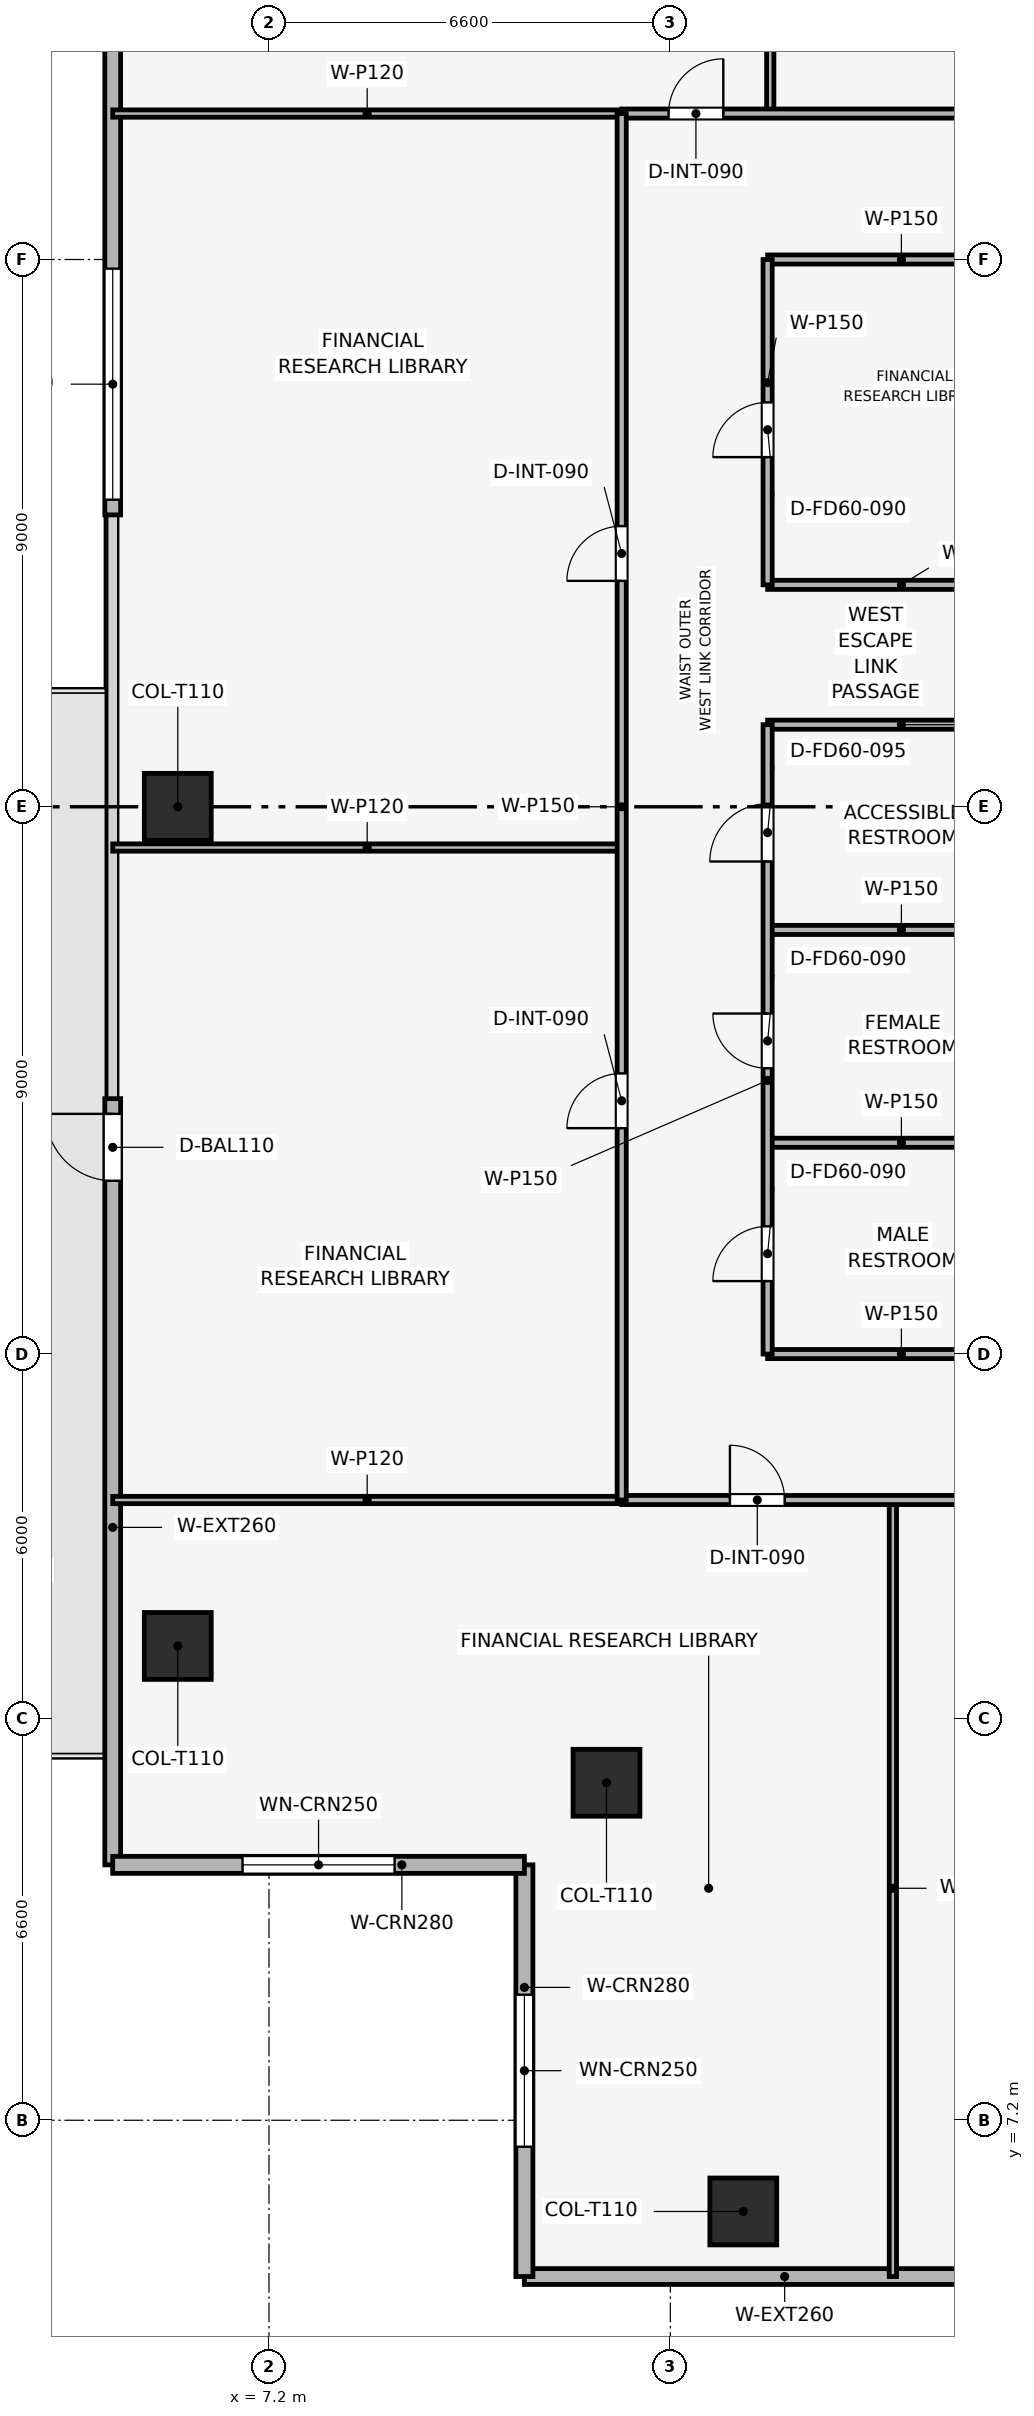
"""IFC4 building model, lengths in metres.
Left out: names, types, materials, properties, quantities, classifications, styles, units other than length and angle.
Written with IfcOpenShell. Run it as: python <this file> out.ifc"""

import sys

from ifc_helpers import new_model, si_unit, direction, frame, frame_2d, origin, origin_2d, place, context, subcontext, project, spatial, rectangle, extrude, element, fill, save


model = new_model("IFC4")
c1 = context("Model", 3, precision=1e-05, world=origin(), true_north=direction((0.0, 1.0)))
c2 = subcontext(c1, "Body", "Model", "MODEL_VIEW")
j1 = project(units=[si_unit("LENGTHUNIT", "METRE"), si_unit("PLANEANGLEUNIT", "RADIAN")], contexts=[c1])
p1 = place(None, origin())
s1 = spatial("IfcSite", under=j1, at=p1, CompositionType="ELEMENT")
p2 = place(p1, origin())
s2 = spatial("IfcBuilding", under=s1, at=p2, CompositionType="ELEMENT")
p3 = place(p2, frame((0.0, 0.0, 145.8)))
s3 = spatial("IfcBuildingStorey", under=s2, at=p3, CompositionType="ELEMENT", Elevation=145.8)
for number, where, z_axis, x_axis in (
    (1, (15.0, 5.7, 0.003), (0.0, 0.0, 1.0), (1.0, 0.0, 0.0)),
    (2, (5.7, 28.8, 0.003), (0.0, 0.0, 1.0), (1.0, 0.0, 0.0)),
    (3, (5.7, 15.0, 0.003), (0.0, 0.0, 1.0), (1.0, 0.0, 0.0)),
    (4, (12.75, 12.75, 0.003), (0.0, 0.0, 1.0), (1.0, 0.0, 0.0)),
):
    element("IfcColumn", number, at=place(p3, frame(where, z_axis=z_axis, x_axis=x_axis)), inside=s3, PredefinedType="COLUMN", context=c2, shape_type="SweptSolid", body=[
        extrude(rectangle(XDim=1.1, YDim=1.1, at=origin_2d()), origin(), (0.0, 0.0, 1.0), 3.489),
    ])
p4 = place(p3, frame((24.0, 4.63, 0.0), z_axis=(0.0, 0.0, 1.0), x_axis=(-1.0, 0.0, 0.0)))
e5 = element("IfcWall", 5, at=p4, inside=s3, PredefinedType="SOLIDWALL", context=c2, shape_type="SweptSolid", body=[
    extrude(rectangle(XDim=12.6, YDim=0.26, at=frame_2d((6.3, 0.0))), origin(), (0.0, 0.0, 1.0), 3.495),
])
p5 = place(p4, frame((0.25, 0.0, 0.9)))
e6 = element("IfcOpeningElement", 6, at=p5, cuts=e5, PredefinedType="OPENING", context=c2, shape_type="SweptSolid", body=[
    extrude(rectangle(XDim=3.8, YDim=1.9, at=frame_2d((1.9, 0.95))), frame((0.0, 0.14, 0.0), z_axis=(0.0, -1.0, 0.0), x_axis=(1.0, 0.0, 0.0)), (0.0, 0.0, 1.0), 0.28),
])
p6 = place(p3, frame((4.63, 11.4, 0.0), z_axis=(0.0, 0.0, 1.0), x_axis=(0.0, 1.0, 0.0)))
e7 = element("IfcWall", 7, at=p6, inside=s3, PredefinedType="SOLIDWALL", context=c2, shape_type="SweptSolid", body=[
    extrude(rectangle(XDim=12.6, YDim=0.26, at=frame_2d((6.3, 0.0))), origin(), (0.0, 0.0, 1.0), 3.495),
])
p7 = place(p6, frame((11.25, 0.0, 0.0)))
e8 = element("IfcOpeningElement", 8, at=p7, cuts=e7, PredefinedType="OPENING", context=c2, shape_type="SweptSolid", body=[
    extrude(rectangle(XDim=1.1, YDim=2.2, at=frame_2d((0.55, 1.1))), frame((0.0, 0.14, 0.0), z_axis=(0.0, -1.0, 0.0), x_axis=(1.0, 0.0, 0.0)), (0.0, 0.0, 1.0), 0.28),
])
p8 = place(p3, frame((4.63, 33.6, 0.0), z_axis=(0.0, 0.0, 1.0), x_axis=(0.0, 1.0, 0.0)))
e9 = element("IfcWall", 9, at=p8, inside=s3, PredefinedType="SOLIDWALL", context=c2, shape_type="SweptSolid", body=[
    extrude(rectangle(XDim=12.6, YDim=0.26, at=frame_2d((6.3, 0.0))), origin(), (0.0, 0.0, 1.0), 3.495),
])
p9 = place(p8, frame((0.25, 0.0, 0.9)))
e10 = element("IfcOpeningElement", 10, at=p9, cuts=e9, PredefinedType="OPENING", context=c2, shape_type="SweptSolid", body=[
    extrude(rectangle(XDim=3.8, YDim=1.9, at=frame_2d((1.9, 0.95))), frame((0.0, 0.14, 0.0), z_axis=(0.0, -1.0, 0.0), x_axis=(1.0, 0.0, 0.0)), (0.0, 0.0, 1.0), 0.28),
])
p10 = place(p3, frame((11.4, 4.63, 0.0), z_axis=(0.0, 0.0, 1.0), x_axis=(0.0, 1.0, 0.0)))
e11 = element("IfcWall", 11, at=p10, inside=s3, PredefinedType="SOLIDWALL", context=c2, shape_type="SweptSolid", body=[
    extrude(rectangle(XDim=6.77, YDim=0.28, at=frame_2d((3.385, 0.0))), origin(), (0.0, 0.0, 1.0), 3.495),
])
p11 = place(p10, frame((2.135, 0.0, 0.9)))
e12 = element("IfcOpeningElement", 12, at=p11, cuts=e11, PredefinedType="OPENING", context=c2, shape_type="SweptSolid", body=[
    extrude(rectangle(XDim=2.5, YDim=1.9, at=frame_2d((1.25, 0.95))), frame((0.0, 0.15, 0.0), z_axis=(0.0, -1.0, 0.0), x_axis=(1.0, 0.0, 0.0)), (0.0, 0.0, 1.0), 0.3),
])
p12 = place(p3, frame((11.4, 11.4, 0.0), z_axis=(0.0, 0.0, 1.0), x_axis=(-1.0, 0.0, 0.0)))
e13 = element("IfcWall", 13, at=p12, inside=s3, PredefinedType="SOLIDWALL", context=c2, shape_type="SweptSolid", body=[
    extrude(rectangle(XDim=6.77, YDim=0.28, at=frame_2d((3.385, 0.0))), origin(), (0.0, 0.0, 1.0), 3.495),
])
p13 = place(p12, frame((2.135, 0.0, 0.9)))
e14 = element("IfcOpeningElement", 14, at=p13, cuts=e13, PredefinedType="OPENING", context=c2, shape_type="SweptSolid", body=[
    extrude(rectangle(XDim=2.5, YDim=1.9, at=frame_2d((1.25, 0.95))), frame((0.0, 0.15, 0.0), z_axis=(0.0, -1.0, 0.0), x_axis=(1.0, 0.0, 0.0)), (0.0, 0.0, 1.0), 0.3),
])
p14 = place(p3, frame((15.4, 19.8, 0.0), z_axis=(0.0, 0.0, 1.0), x_axis=(1.0, 0.0, 0.0)))
e15 = element("IfcWall", 15, at=p14, inside=s3, PredefinedType="PARTITIONING", context=c2, shape_type="SweptSolid", body=[
    extrude(rectangle(XDim=4.4, YDim=0.15, at=frame_2d((2.2, 0.0))), origin(), (0.0, 0.0, 1.0), 3.03),
])
for number, where, z_axis, x_axis in (
    (16, (15.4, 23.275, 0.0), (0.0, 0.0, 1.0), (1.0, 0.0, 0.0)),
    (17, (15.4, 26.775, 0.0), (0.0, 0.0, 1.0), (1.0, 0.0, 0.0)),
    (18, (15.4, 30.15, 0.0), (0.0, 0.0, 1.0), (1.0, 0.0, 0.0)),
    (19, (15.4, 32.45, 0.0), (0.0, 0.0, 1.0), (1.0, 0.0, 0.0)),
):
    element("IfcWall", number, at=place(p3, frame(where, z_axis=z_axis, x_axis=x_axis)), inside=s3, PredefinedType="PARTITIONING", context=c2, shape_type="SweptSolid", body=[
        extrude(rectangle(XDim=4.4, YDim=0.15, at=frame_2d((2.2, 0.0))), origin(), (0.0, 0.0, 1.0), 3.495),
    ])
p15 = place(p3, frame((15.4, 37.8, 0.0), z_axis=(0.0, 0.0, 1.0), x_axis=(1.0, 0.0, 0.0)))
e20 = element("IfcWall", 20, at=p15, inside=s3, PredefinedType="PARTITIONING", context=c2, shape_type="SweptSolid", body=[
    extrude(rectangle(XDim=4.4, YDim=0.15, at=frame_2d((2.2, 0.0))), origin(), (0.0, 0.0, 1.0), 3.03),
])
p16 = place(p3, frame((15.4, 19.8, 0.0), z_axis=(0.0, 0.0, 1.0), x_axis=(0.0, 1.0, 0.0)))
e21 = element("IfcWall", 21, at=p16, inside=s3, PredefinedType="PARTITIONING", context=c2, shape_type="SweptSolid", body=[
    extrude(rectangle(XDim=10.35, YDim=0.15, at=frame_2d((5.175, 0.0))), origin(), (0.0, 0.0, 1.0), 3.03),
])
p17 = place(p16, frame((1.2, 0.0, 0.0)))
e22 = element("IfcOpeningElement", 22, at=p17, cuts=e21, PredefinedType="OPENING", context=c2, shape_type="SweptSolid", body=[
    extrude(rectangle(XDim=0.9, YDim=2.1, at=frame_2d((0.45, 1.05))), frame((0.0, 0.085, 0.0), z_axis=(0.0, -1.0, 0.0), x_axis=(1.0, 0.0, 0.0)), (0.0, 0.0, 1.0), 0.17),
])
p18 = place(p16, frame((4.7, 0.0, 0.0)))
e23 = element("IfcOpeningElement", 23, at=p18, cuts=e21, PredefinedType="OPENING", context=c2, shape_type="SweptSolid", body=[
    extrude(rectangle(XDim=0.9, YDim=2.1, at=frame_2d((0.45, 1.05))), frame((0.0, 0.085, 0.0), z_axis=(0.0, -1.0, 0.0), x_axis=(1.0, 0.0, 0.0)), (0.0, 0.0, 1.0), 0.17),
])
p19 = place(p16, frame((8.1, 0.0, 0.0)))
e24 = element("IfcOpeningElement", 24, at=p19, cuts=e21, PredefinedType="OPENING", context=c2, shape_type="SweptSolid", body=[
    extrude(rectangle(XDim=0.95, YDim=2.1, at=frame_2d((0.475, 1.05))), frame((0.0, 0.085, 0.0), z_axis=(0.0, -1.0, 0.0), x_axis=(1.0, 0.0, 0.0)), (0.0, 0.0, 1.0), 0.17),
])
p20 = place(p3, frame((15.4, 32.45, 0.0), z_axis=(0.0, 0.0, 1.0), x_axis=(0.0, 1.0, 0.0)))
e25 = element("IfcWall", 25, at=p20, inside=s3, PredefinedType="PARTITIONING", context=c2, shape_type="SweptSolid", body=[
    extrude(rectangle(XDim=5.35, YDim=0.15, at=frame_2d((2.675, 0.0))), origin(), (0.0, 0.0, 1.0), 3.03),
])
p21 = place(p20, frame((2.1, 0.0, 0.0)))
e26 = element("IfcOpeningElement", 26, at=p21, cuts=e25, PredefinedType="OPENING", context=c2, shape_type="SweptSolid", body=[
    extrude(rectangle(XDim=0.9, YDim=2.1, at=frame_2d((0.45, 1.05))), frame((0.0, 0.085, 0.0), z_axis=(0.0, -1.0, 0.0), x_axis=(1.0, 0.0, 0.0)), (0.0, 0.0, 1.0), 0.17),
])
for number, where, z_axis, x_axis in (
    (27, (17.46, 4.63, 0.0), (0.0, 0.0, 1.0), (0.0, 1.0, 0.0)),
    (28, (15.443, 40.2, 0.0), (0.0, 0.0, 1.0), (0.0, 1.0, 0.0)),
):
    element("IfcWall", number, at=place(p3, frame(where, z_axis=z_axis, x_axis=x_axis)), inside=s3, PredefinedType="PARTITIONING", context=c2, shape_type="SweptSolid", body=[
        extrude(rectangle(XDim=12.77, YDim=0.12, at=frame_2d((6.385, 0.0))), origin(), (0.0, 0.0, 1.0), 2.98),
    ])
for number, where, z_axis, x_axis in (
    (29, (4.63, 28.13, 0.0), (0.0, 0.0, 1.0), (1.0, 0.0, 0.0)),
    (30, (4.63, 17.4, 0.0), (0.0, 0.0, 1.0), (1.0, 0.0, 0.0)),
    (31, (4.63, 40.2, 0.0), (0.0, 0.0, 1.0), (1.0, 0.0, 0.0)),
):
    element("IfcWall", number, at=place(p3, frame(where, z_axis=z_axis, x_axis=x_axis)), inside=s3, PredefinedType="PARTITIONING", context=c2, shape_type="SweptSolid", body=[
        extrude(rectangle(XDim=8.37, YDim=0.12, at=frame_2d((4.185, 0.0))), origin(), (0.0, 0.0, 1.0), 2.98),
    ])
p22 = place(p3, frame((13.0, 17.4, 0.0), z_axis=(0.0, 0.0, 1.0), x_axis=(1.0, 0.0, 0.0)))
e32 = element("IfcWall", 32, at=p22, inside=s3, PredefinedType="PARTITIONING", context=c2, shape_type="SweptSolid", body=[
    extrude(rectangle(XDim=31.6, YDim=0.15, at=frame_2d((15.8, 0.0))), origin(), (0.0, 0.0, 1.0), 3.03),
])
p23 = place(p22, frame((1.78, 0.0, 0.0)))
e33 = element("IfcOpeningElement", 33, at=p23, cuts=e32, PredefinedType="OPENING", context=c2, shape_type="SweptSolid", body=[
    extrude(rectangle(XDim=0.9, YDim=2.1, at=frame_2d((0.45, 1.05))), frame((0.0, 0.085, 0.0), z_axis=(0.0, -1.0, 0.0), x_axis=(1.0, 0.0, 0.0)), (0.0, 0.0, 1.0), 0.17),
])
p24 = place(p22, frame((17.58, 0.0, 0.0)))
e34 = element("IfcOpeningElement", 34, at=p24, cuts=e32, PredefinedType="OPENING", context=c2, shape_type="SweptSolid", body=[
    extrude(rectangle(XDim=0.9, YDim=2.1, at=frame_2d((0.45, 1.05))), frame((0.0, 0.085, 0.0), z_axis=(0.0, -1.0, 0.0), x_axis=(1.0, 0.0, 0.0)), (0.0, 0.0, 1.0), 0.17),
])
p25 = place(p3, frame((13.0, 40.2, 0.0), z_axis=(0.0, 0.0, 1.0), x_axis=(1.0, 0.0, 0.0)))
e35 = element("IfcWall", 35, at=p25, inside=s3, PredefinedType="PARTITIONING", context=c2, shape_type="SweptSolid", body=[
    extrude(rectangle(XDim=31.6, YDim=0.15, at=frame_2d((15.8, 0.0))), origin(), (0.0, 0.0, 1.0), 3.03),
])
p26 = place(p25, frame((0.771, 0.0, 0.0)))
e36 = element("IfcOpeningElement", 36, at=p26, cuts=e35, PredefinedType="OPENING", context=c2, shape_type="SweptSolid", body=[
    extrude(rectangle(XDim=0.9, YDim=2.1, at=frame_2d((0.45, 1.05))), frame((0.0, 0.085, 0.0), z_axis=(0.0, -1.0, 0.0), x_axis=(1.0, 0.0, 0.0)), (0.0, 0.0, 1.0), 0.17),
])
p27 = place(p25, frame((6.409, 0.0, 0.0)))
e37 = element("IfcOpeningElement", 37, at=p27, cuts=e35, PredefinedType="OPENING", context=c2, shape_type="SweptSolid", body=[
    extrude(rectangle(XDim=0.9, YDim=2.1, at=frame_2d((0.45, 1.05))), frame((0.0, 0.085, 0.0), z_axis=(0.0, -1.0, 0.0), x_axis=(1.0, 0.0, 0.0)), (0.0, 0.0, 1.0), 0.17),
])
p28 = place(p25, frame((15.239, 0.0, 0.0)))
e38 = element("IfcOpeningElement", 38, at=p28, cuts=e35, PredefinedType="OPENING", context=c2, shape_type="SweptSolid", body=[
    extrude(rectangle(XDim=0.9, YDim=2.1, at=frame_2d((0.45, 1.05))), frame((0.0, 0.085, 0.0), z_axis=(0.0, -1.0, 0.0), x_axis=(1.0, 0.0, 0.0)), (0.0, 0.0, 1.0), 0.17),
])
p29 = place(p25, frame((25.402, 0.0, 0.0)))
e39 = element("IfcOpeningElement", 39, at=p29, cuts=e35, PredefinedType="OPENING", context=c2, shape_type="SweptSolid", body=[
    extrude(rectangle(XDim=0.9, YDim=2.1, at=frame_2d((0.45, 1.05))), frame((0.0, 0.085, 0.0), z_axis=(0.0, -1.0, 0.0), x_axis=(1.0, 0.0, 0.0)), (0.0, 0.0, 1.0), 0.17),
])
p30 = place(p3, frame((13.0, 17.4, 0.0), z_axis=(0.0, 0.0, 1.0), x_axis=(0.0, 1.0, 0.0)))
e40 = element("IfcWall", 40, at=p30, inside=s3, PredefinedType="PARTITIONING", context=c2, shape_type="SweptSolid", body=[
    extrude(rectangle(XDim=22.8, YDim=0.15, at=frame_2d((11.4, 0.0))), origin(), (0.0, 0.0, 1.0), 3.03),
])
p31 = place(p30, frame((6.115, 0.0, 0.0)))
e41 = element("IfcOpeningElement", 41, at=p31, cuts=e40, PredefinedType="OPENING", context=c2, shape_type="SweptSolid", body=[
    extrude(rectangle(XDim=0.9, YDim=2.1, at=frame_2d((0.45, 1.05))), frame((0.0, 0.085, 0.0), z_axis=(0.0, -1.0, 0.0), x_axis=(1.0, 0.0, 0.0)), (0.0, 0.0, 1.0), 0.17),
])
p32 = place(p30, frame((15.115, 0.0, 0.0)))
e42 = element("IfcOpeningElement", 42, at=p32, cuts=e40, PredefinedType="OPENING", context=c2, shape_type="SweptSolid", body=[
    extrude(rectangle(XDim=0.9, YDim=2.1, at=frame_2d((0.45, 1.05))), frame((0.0, 0.085, 0.0), z_axis=(0.0, -1.0, 0.0), x_axis=(1.0, 0.0, 0.0)), (0.0, 0.0, 1.0), 0.17),
])
p33 = place(p7, origin())
e43 = element("IfcDoor", 43, at=p33, inside=s3, OperationType="SINGLE_SWING_RIGHT", PredefinedType="DOOR", context=c2, shape_type="SweptSolid", body=[
    extrude(rectangle(XDim=1.1, YDim=2.2, at=frame_2d((0.55, 1.1))), frame((0.0, 0.025, 0.0), z_axis=(0.0, -1.0, 0.0), x_axis=(1.0, 0.0, 0.0)), (0.0, 0.0, 1.0), 0.05),
])
fill(e8, e43)
p34 = place(p9, origin())
e44 = element("IfcWindow", 44, at=p34, inside=s3, PartitioningType="SINGLE_PANEL", PredefinedType="WINDOW", context=c2, shape_type="SweptSolid", body=[
    extrude(rectangle(XDim=3.8, YDim=1.9, at=frame_2d((1.9, 0.95))), frame((0.0, 0.03, 0.0), z_axis=(0.0, -1.0, 0.0), x_axis=(1.0, 0.0, 0.0)), (0.0, 0.0, 1.0), 0.06),
])
fill(e10, e44)
p35 = place(p11, origin())
e45 = element("IfcWindow", 45, at=p35, inside=s3, PartitioningType="SINGLE_PANEL", PredefinedType="WINDOW", context=c2, shape_type="SweptSolid", body=[
    extrude(rectangle(XDim=2.5, YDim=1.9, at=frame_2d((1.25, 0.95))), frame((0.0, 0.03, 0.0), z_axis=(0.0, -1.0, 0.0), x_axis=(1.0, 0.0, 0.0)), (0.0, 0.0, 1.0), 0.06),
])
fill(e12, e45)
p36 = place(p13, origin())
e46 = element("IfcWindow", 46, at=p36, inside=s3, PartitioningType="SINGLE_PANEL", PredefinedType="WINDOW", context=c2, shape_type="SweptSolid", body=[
    extrude(rectangle(XDim=2.5, YDim=1.9, at=frame_2d((1.25, 0.95))), frame((0.0, 0.03, 0.0), z_axis=(0.0, -1.0, 0.0), x_axis=(1.0, 0.0, 0.0)), (0.0, 0.0, 1.0), 0.06),
])
fill(e14, e46)
p37 = place(p17, origin())
e47 = element("IfcDoor", 47, at=p37, inside=s3, OperationType="SINGLE_SWING_LEFT", PredefinedType="DOOR", context=c2, shape_type="SweptSolid", body=[
    extrude(rectangle(XDim=0.9, YDim=2.1, at=frame_2d((0.45, 1.05))), frame((0.0, 0.025, 0.0), z_axis=(0.0, -1.0, 0.0), x_axis=(1.0, 0.0, 0.0)), (0.0, 0.0, 1.0), 0.05),
])
fill(e22, e47)
p38 = place(p18, origin())
e48 = element("IfcDoor", 48, at=p38, inside=s3, OperationType="SINGLE_SWING_RIGHT", PredefinedType="DOOR", context=c2, shape_type="SweptSolid", body=[
    extrude(rectangle(XDim=0.9, YDim=2.1, at=frame_2d((0.45, 1.05))), frame((0.0, 0.025, 0.0), z_axis=(0.0, -1.0, 0.0), x_axis=(1.0, 0.0, 0.0)), (0.0, 0.0, 1.0), 0.05),
])
fill(e23, e48)
p39 = place(p19, origin())
e49 = element("IfcDoor", 49, at=p39, inside=s3, OperationType="SINGLE_SWING_LEFT", PredefinedType="DOOR", context=c2, shape_type="SweptSolid", body=[
    extrude(rectangle(XDim=0.95, YDim=2.1, at=frame_2d((0.475, 1.05))), frame((0.0, 0.025, 0.0), z_axis=(0.0, -1.0, 0.0), x_axis=(1.0, 0.0, 0.0)), (0.0, 0.0, 1.0), 0.05),
])
fill(e24, e49)
p40 = place(p21, origin())
e50 = element("IfcDoor", 50, at=p40, inside=s3, OperationType="SINGLE_SWING_LEFT", PredefinedType="DOOR", context=c2, shape_type="SweptSolid", body=[
    extrude(rectangle(XDim=0.9, YDim=2.1, at=frame_2d((0.45, 1.05))), frame((0.0, 0.025, 0.0), z_axis=(0.0, -1.0, 0.0), x_axis=(1.0, 0.0, 0.0)), (0.0, 0.0, 1.0), 0.05),
])
fill(e26, e50)
p41 = place(p23, origin())
e51 = element("IfcDoor", 51, at=p41, inside=s3, OperationType="SINGLE_SWING_LEFT", PredefinedType="DOOR", context=c2, shape_type="SweptSolid", body=[
    extrude(rectangle(XDim=0.9, YDim=2.1, at=frame_2d((0.45, 1.05))), frame((0.0, 0.025, 0.0), z_axis=(0.0, -1.0, 0.0), x_axis=(1.0, 0.0, 0.0)), (0.0, 0.0, 1.0), 0.05),
])
fill(e33, e51)
p42 = place(p26, origin())
e52 = element("IfcDoor", 52, at=p42, inside=s3, OperationType="SINGLE_SWING_RIGHT", PredefinedType="DOOR", context=c2, shape_type="SweptSolid", body=[
    extrude(rectangle(XDim=0.9, YDim=2.1, at=frame_2d((0.45, 1.05))), frame((0.0, 0.025, 0.0), z_axis=(0.0, -1.0, 0.0), x_axis=(1.0, 0.0, 0.0)), (0.0, 0.0, 1.0), 0.05),
])
fill(e36, e52)
p43 = place(p31, origin())
e53 = element("IfcDoor", 53, at=p43, inside=s3, OperationType="SINGLE_SWING_LEFT", PredefinedType="DOOR", context=c2, shape_type="SweptSolid", body=[
    extrude(rectangle(XDim=0.9, YDim=2.1, at=frame_2d((0.45, 1.05))), frame((0.0, 0.025, 0.0), z_axis=(0.0, -1.0, 0.0), x_axis=(1.0, 0.0, 0.0)), (0.0, 0.0, 1.0), 0.05),
])
fill(e41, e53)
p44 = place(p32, origin())
e54 = element("IfcDoor", 54, at=p44, inside=s3, OperationType="SINGLE_SWING_LEFT", PredefinedType="DOOR", context=c2, shape_type="SweptSolid", body=[
    extrude(rectangle(XDim=0.9, YDim=2.1, at=frame_2d((0.45, 1.05))), frame((0.0, 0.025, 0.0), z_axis=(0.0, -1.0, 0.0), x_axis=(1.0, 0.0, 0.0)), (0.0, 0.0, 1.0), 0.05),
])
fill(e42, e54)
save(model, sys.argv[1])
